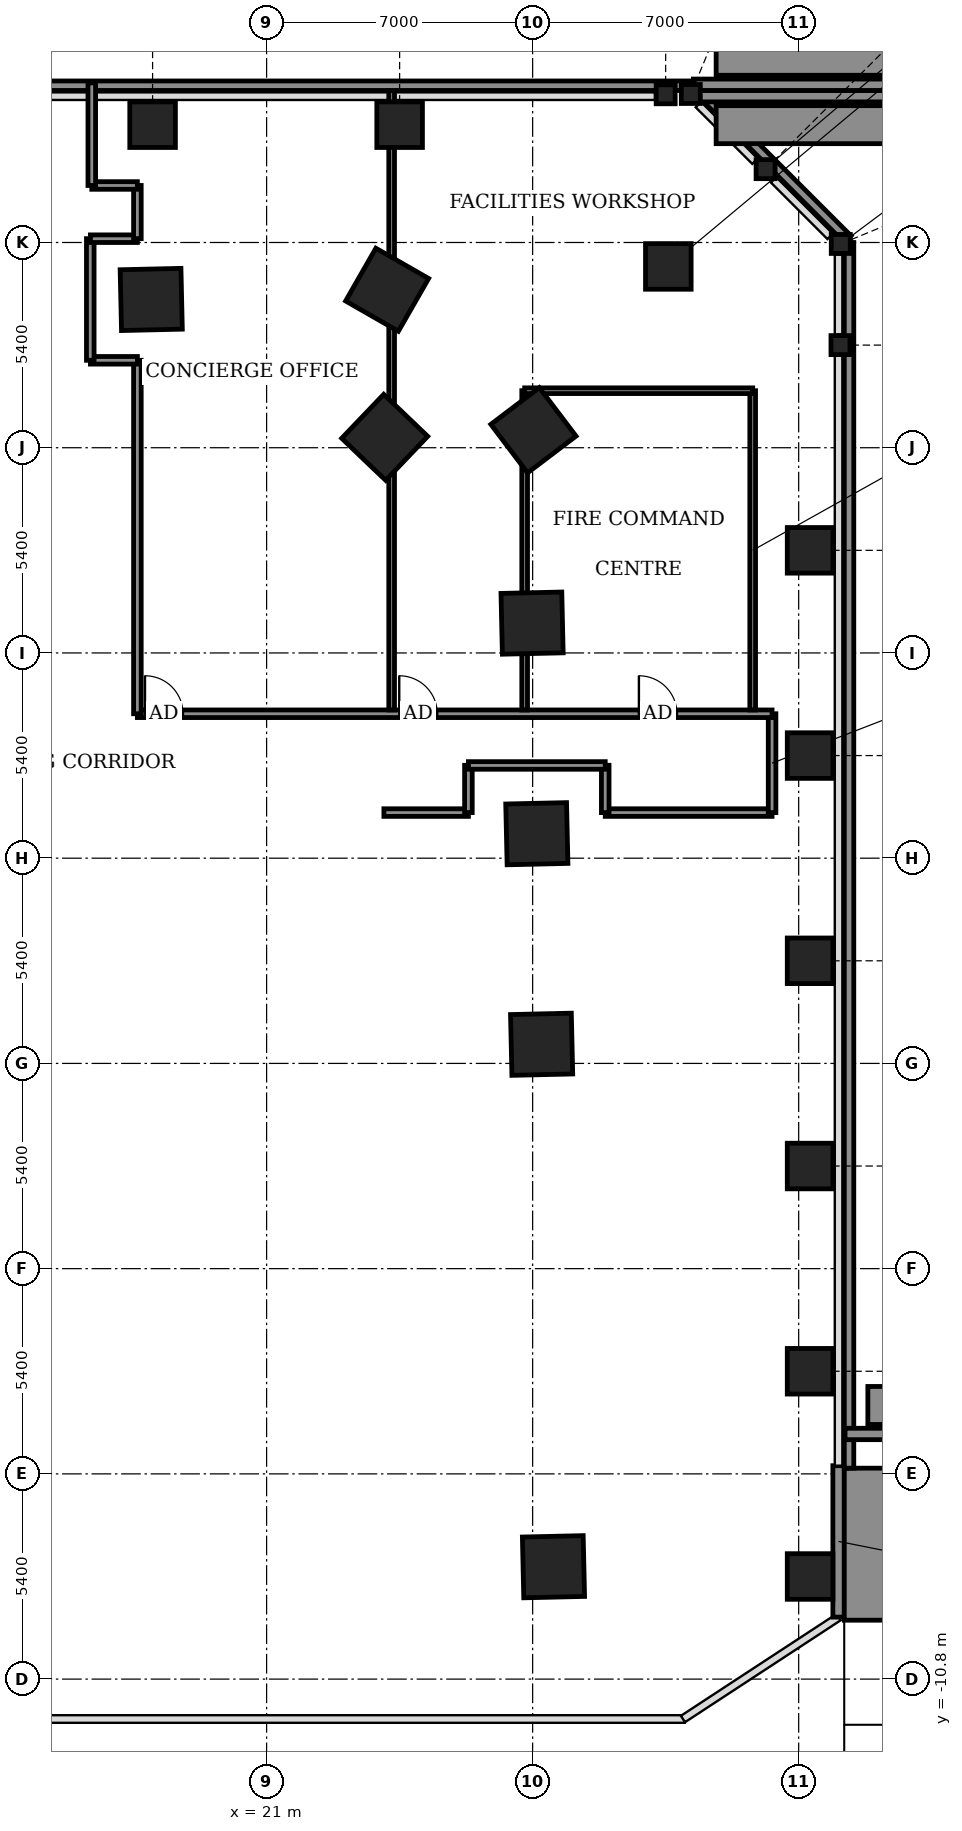
"""IFC4 building model, lengths in metres.
Left out: names, types, materials, properties, quantities, classifications, styles, units other than length and angle.
Written with IfcOpenShell. Run it as: python <this file> out.ifc"""

import sys

from ifc_helpers import new_model, si_unit, direction, frame, frame_2d, origin, origin_2d, place, context, subcontext, project, spatial, rectangle, extrude, element, fill, save


model = new_model("IFC4")
c1 = context("Model", 3, precision=1e-05, world=origin(), true_north=direction((0.0, 1.0)))
c2 = subcontext(c1, "Body", "Model", "MODEL_VIEW")
j1 = project(units=[si_unit("LENGTHUNIT", "METRE"), si_unit("PLANEANGLEUNIT", "RADIAN")], contexts=[c1])
p1 = place(None, origin())
s1 = spatial("IfcSite", under=j1, at=p1, CompositionType="ELEMENT")
p2 = place(p1, origin())
s2 = spatial("IfcBuilding", under=s1, at=p2, CompositionType="ELEMENT")
p3 = place(p2, origin())
s3 = spatial("IfcBuildingStorey", under=s2, at=p3, CompositionType="ELEMENT", Elevation=0.0)
for number, where, z_axis, x_axis in (
    (1, (28.548, -7.843, -0.3), (0.0, 0.0, 1.0), (-0.023, 1.0, 0.0)),
    (2, (28.236, 5.904, -0.3), (0.0, 0.0, 1.0), (-0.023, 1.0, 0.0)),
    (3, (28.11, 11.444, -0.3), (0.0, 0.0, 1.0), (-0.023, 1.0, 0.0)),
    (4, (27.985, 16.985, -0.3), (0.0, 0.0, 1.0), (-0.023, 1.0, 0.0)),
    (5, (28.021, 22.06, -0.3), (0.0, 0.0, 1.0), (-0.604, 0.797, 0.0)),
    (6, (24.107, 21.874, -0.3), (0.0, 0.0, 1.0), (-0.723, 0.691, 0.0)),
    (7, (24.171, 25.757, -0.3), (0.0, 0.0, 1.0), (-0.868, 0.497, 0.0)),
    (8, (17.964, 25.501, -0.3), (0.0, 0.0, 1.0), (-1.0, -0.023, 0.0)),
):
    element("IfcColumn", number, at=place(p3, frame(where, z_axis=z_axis, x_axis=x_axis)), inside=s3, PredefinedType="COLUMN", context=c2, shape_type="SweptSolid", body=[
        extrude(rectangle(XDim=1.6, YDim=1.6, at=origin_2d()), origin(), (0.0, 0.0, 1.0), 5.75),
    ])
for number, where, z_axis, x_axis in (
    (9, (18.0, 30.1, -0.3), (0.0, 0.0, 1.0), (1.0, 0.0, 0.0)),
    (10, (24.5, 30.1, -0.3), (0.0, 0.0, 1.0), (1.0, 0.0, 0.0)),
    (11, (35.3, -8.1, -0.3), (0.0, 0.0, 1.0), (1.0, 0.0, 0.0)),
    (12, (35.3, -2.7, -0.3), (0.0, 0.0, 1.0), (1.0, 0.0, 0.0)),
    (13, (35.3, 2.7, -0.3), (0.0, 0.0, 1.0), (1.0, 0.0, 0.0)),
    (14, (35.3, 8.1, -0.3), (0.0, 0.0, 1.0), (1.0, 0.0, 0.0)),
    (15, (35.3, 13.5, -0.3), (0.0, 0.0, 1.0), (1.0, 0.0, 0.0)),
    (16, (35.3, 18.9, -0.3), (0.0, 0.0, 1.0), (1.0, 0.0, 0.0)),
    (17, (31.57, 26.37, -0.3), (0.0, 0.0, 1.0), (1.0, 0.0, 0.0)),
):
    element("IfcColumn", number, at=place(p3, frame(where, z_axis=z_axis, x_axis=x_axis)), inside=s3, PredefinedType="COLUMN", context=c2, shape_type="SweptSolid", body=[
        extrude(rectangle(XDim=1.2, YDim=1.2, at=origin_2d()), origin(), (0.0, 0.0, 1.0), 5.75),
    ])
for number, where, z_axis, x_axis in (
    (18, (36.1, 24.3, -0.3), (0.0, 0.0, 1.0), (1.0, 0.0, 0.0)),
    (19, (36.108, 26.962, -0.3), (0.0, 0.0, 1.0), (1.0, 0.0, 0.0)),
    (20, (31.5, 30.9, -0.3), (0.0, 0.0, 1.0), (1.0, 0.0, 0.0)),
    (21, (32.162, 30.908, -0.3), (0.0, 0.0, 1.0), (1.0, 0.0, 0.0)),
    (22, (34.129, 28.929, -0.3), (0.0, 0.0, 1.0), (1.0, 0.0, 0.0)),
):
    element("IfcColumn", number, at=place(p3, frame(where, z_axis=z_axis, x_axis=x_axis)), inside=s3, PredefinedType="COLUMN", context=c2, shape_type="SweptSolid", body=[
        extrude(rectangle(XDim=0.5, YDim=0.5, at=origin_2d()), origin(), (0.0, 0.0, 1.0), 5.38),
    ])
p4 = place(p3, frame((36.05, -9.169, 0.0), z_axis=(0.0, 0.0, 1.0), x_axis=(0.0, 1.0, 0.0)))
e23 = element("IfcWall", 23, at=p4, inside=s3, PredefinedType="SOLIDWALL", context=c2, shape_type="SweptSolid", body=[
    extrude(rectangle(XDim=3.984, YDim=0.3, at=frame_2d((1.992, 0.0))), origin(), (0.0, 0.0, 1.0), 5.45),
])
p5 = place(p3, frame((37.45, -9.25, 0.0), z_axis=(0.0, 0.0, 1.0), x_axis=(0.0, 1.0, 0.0)))
e24 = element("IfcWall", 24, at=p5, inside=s3, PredefinedType="STANDARD", context=c2, shape_type="SweptSolid", body=[
    extrude(rectangle(XDim=4.0, YDim=2.5, at=frame_2d((2.0, 0.0))), origin(), (0.0, 0.0, 1.0), 6.0),
])
p6 = place(p3, frame((36.325, -5.25, 0.0), z_axis=(0.0, 0.0, 1.0), x_axis=(0.0, 1.0, 0.0)))
e25 = element("IfcWall", 25, at=p6, inside=s3, PredefinedType="STANDARD", context=c2, shape_type="SweptSolid", body=[
    extrude(rectangle(XDim=32.25, YDim=0.25, at=frame_2d((16.125, 0.0))), origin(), (0.0, 0.0, 1.0), 0.9),
])
p7 = place(p3, frame((36.288, 27.088, 0.0), z_axis=(0.0, 0.0, 1.0), x_axis=(-0.707106781187, 0.707106781187, 0.0)))
e26 = element("IfcWall", 26, at=p7, inside=s3, PredefinedType="STANDARD", context=c2, shape_type="SweptSolid", body=[
    extrude(rectangle(XDim=5.657, YDim=0.25, at=frame_2d((2.828, 0.0))), origin(), (0.0, 0.0, 1.0), 0.9),
])
p8 = place(p3, frame((32.2, 31.125, 0.0), z_axis=(0.0, 0.0, 1.0), x_axis=(-1.0, 0.0, 0.0)))
e27 = element("IfcWall", 27, at=p8, inside=s3, PredefinedType="STANDARD", context=c2, shape_type="SweptSolid", body=[
    extrude(rectangle(XDim=28.9, YDim=0.25, at=frame_2d((14.45, 0.0))), origin(), (0.0, 0.0, 1.0), 0.9),
])
p9 = place(p3, frame((36.22, -4.35, 5.5), z_axis=(0.0, 0.0, 1.0), x_axis=(1.0, 0.0, 0.0)))
e28 = element("IfcWall", 28, at=p9, inside=s3, PredefinedType="PARAPET", context=c2, shape_type="SweptSolid", body=[
    extrude(rectangle(XDim=6.18, YDim=0.3, at=frame_2d((3.09, 0.0))), origin(), (0.0, 0.0, 1.0), 1.15),
])
p10 = place(p3, frame((36.82, -3.6, 5.5), z_axis=(0.0, 0.0, 1.0), x_axis=(1.0, 0.0, 0.0)))
e29 = element("IfcWall", 29, at=p10, inside=s3, PredefinedType="SOLIDWALL", context=c2, shape_type="SweptSolid", body=[
    extrude(rectangle(XDim=4.98, YDim=1.0, at=frame_2d((2.49, 0.0))), origin(), (0.0, 0.0, 1.0), 0.3),
])
p11 = place(p3, frame((41.268, 30.85, 5.5), z_axis=(0.0, 0.0, 1.0), x_axis=(-1.0, 0.0, 0.0)))
e30 = element("IfcWall", 30, at=p11, inside=s3, PredefinedType="PARAPET", context=c2, shape_type="SweptSolid", body=[
    extrude(rectangle(XDim=9.04, YDim=0.3, at=frame_2d((4.52, 0.0))), origin(), (0.0, 0.0, 1.0), 1.15),
])
p12 = place(p3, frame((40.668, 30.1, 5.5), z_axis=(0.0, 0.0, 1.0), x_axis=(-1.0, 0.0, 0.0)))
e31 = element("IfcWall", 31, at=p12, inside=s3, PredefinedType="SOLIDWALL", context=c2, shape_type="SweptSolid", body=[
    extrude(rectangle(XDim=7.84, YDim=1.0, at=frame_2d((3.92, 0.0))), origin(), (0.0, 0.0, 1.0), 0.3),
])
p13 = place(p3, frame((32.228, 31.15, 5.5), z_axis=(0.0, 0.0, 1.0), x_axis=(1.0, 0.0, 0.0)))
e32 = element("IfcWall", 32, at=p13, inside=s3, PredefinedType="PARAPET", context=c2, shape_type="SweptSolid", body=[
    extrude(rectangle(XDim=8.44, YDim=0.3, at=frame_2d((4.22, 0.0))), origin(), (0.0, 0.0, 1.0), 1.15),
])
p14 = place(p3, frame((32.828, 31.9, 5.5), z_axis=(0.0, 0.0, 1.0), x_axis=(1.0, 0.0, 0.0)))
e33 = element("IfcWall", 33, at=p14, inside=s3, PredefinedType="SOLIDWALL", context=c2, shape_type="SweptSolid", body=[
    extrude(rectangle(XDim=6.39, YDim=1.0, at=frame_2d((3.195, 0.0))), origin(), (0.0, 0.0, 1.0), 0.3),
])
p15 = place(p3, frame((40.774, 31.406, 5.5), z_axis=(0.0, 0.0, 1.0), x_axis=(-0.707106781187, 0.707106781187, 0.0)))
e34 = element("IfcWall", 34, at=p15, inside=s3, PredefinedType="PARAPET", context=c2, shape_type="SweptSolid", body=[
    extrude(rectangle(XDim=8.344, YDim=0.3, at=frame_2d((4.172, 0.0))), origin(), (0.0, 0.0, 1.0), 1.15),
])
p16 = place(p3, frame((24.086, 12.0, 0.0), z_axis=(0.0, 0.0, 1.0), x_axis=(1.0, 0.0, 0.0)))
e35 = element("IfcWall", 35, at=p16, inside=s3, PredefinedType="PARTITIONING", context=c2, shape_type="SweptSolid", body=[
    extrude(rectangle(XDim=2.224, YDim=0.2, at=frame_2d((1.112, 0.0))), origin(), (0.0, 0.0, 1.0), 5.45),
])
p17 = place(p3, frame((26.31, 12.0, 0.0), z_axis=(0.0, 0.0, 1.0), x_axis=(0.0, 1.0, 0.0)))
e36 = element("IfcWall", 36, at=p17, inside=s3, PredefinedType="PARTITIONING", context=c2, shape_type="SweptSolid", body=[
    extrude(rectangle(XDim=1.244, YDim=0.2, at=frame_2d((0.622, 0.0))), origin(), (0.0, 0.0, 1.0), 5.45),
])
p18 = place(p3, frame((29.91, 12.0, 0.0), z_axis=(0.0, 0.0, 1.0), x_axis=(1.0, 0.0, 0.0)))
e37 = element("IfcWall", 37, at=p18, inside=s3, PredefinedType="PARTITIONING", context=c2, shape_type="SweptSolid", body=[
    extrude(rectangle(XDim=4.39, YDim=0.2, at=frame_2d((2.195, 0.0))), origin(), (0.0, 0.0, 1.0), 5.45),
])
p19 = place(p3, frame((29.91, 12.0, 0.0), z_axis=(0.0, 0.0, 1.0), x_axis=(0.0, 1.0, 0.0)))
e38 = element("IfcWall", 38, at=p19, inside=s3, PredefinedType="PARTITIONING", context=c2, shape_type="SweptSolid", body=[
    extrude(rectangle(XDim=1.244, YDim=0.2, at=frame_2d((0.622, 0.0))), origin(), (0.0, 0.0, 1.0), 5.45),
])
p20 = place(p3, frame((34.3, 12.0, 0.0), z_axis=(0.0, 0.0, 1.0), x_axis=(0.0, 1.0, 0.0)))
e39 = element("IfcWall", 39, at=p20, inside=s3, PredefinedType="PARTITIONING", context=c2, shape_type="SweptSolid", body=[
    extrude(rectangle(XDim=2.6, YDim=0.2, at=frame_2d((1.3, 0.0))), origin(), (0.0, 0.0, 1.0), 5.45),
])
p21 = place(p3, frame((26.31, 13.24, 0.0), z_axis=(0.0, 0.0, 1.0), x_axis=(1.0, 0.0, 0.0)))
e40 = element("IfcWall", 40, at=p21, inside=s3, PredefinedType="PARTITIONING", context=c2, shape_type="SweptSolid", body=[
    extrude(rectangle(XDim=3.6, YDim=0.2, at=frame_2d((1.8, 0.0))), origin(), (0.0, 0.0, 1.0), 5.45),
])
p22 = place(p3, frame((17.6, 14.6, 0.0), z_axis=(0.0, 0.0, 1.0), x_axis=(1.0, 0.0, 0.0)))
e41 = element("IfcWall", 41, at=p22, inside=s3, PredefinedType="PARTITIONING", context=c2, shape_type="SweptSolid", body=[
    extrude(rectangle(XDim=16.7, YDim=0.2, at=frame_2d((8.35, 0.0))), origin(), (0.0, 0.0, 1.0), 5.45),
])
p23 = place(p22, frame((13.196, 0.0, 0.0)))
e42 = element("IfcOpeningElement", 42, at=p23, cuts=e41, PredefinedType="OPENING", context=c2, shape_type="SweptSolid", body=[
    extrude(rectangle(XDim=1.0, YDim=2.1, at=frame_2d((0.5, 1.05))), frame((0.0, 0.11, 0.0), z_axis=(0.0, -1.0, 0.0), x_axis=(1.0, 0.0, 0.0)), (0.0, 0.0, 1.0), 0.22),
])
p24 = place(p22, frame((0.2, 0.0, 0.0)))
e43 = element("IfcOpeningElement", 43, at=p24, cuts=e41, PredefinedType="OPENING", context=c2, shape_type="SweptSolid", body=[
    extrude(rectangle(XDim=1.0, YDim=2.1, at=frame_2d((0.5, 1.05))), frame((0.0, 0.11, 0.0), z_axis=(0.0, -1.0, 0.0), x_axis=(1.0, 0.0, 0.0)), (0.0, 0.0, 1.0), 0.22),
])
p25 = place(p22, frame((6.89, 0.0, 0.0)))
e44 = element("IfcOpeningElement", 44, at=p25, cuts=e41, PredefinedType="OPENING", context=c2, shape_type="SweptSolid", body=[
    extrude(rectangle(XDim=1.0, YDim=2.1, at=frame_2d((0.5, 1.05))), frame((0.0, 0.11, 0.0), z_axis=(0.0, -1.0, 0.0), x_axis=(1.0, 0.0, 0.0)), (0.0, 0.0, 1.0), 0.22),
])
p26 = place(p3, frame((17.6, 14.6, 0.0), z_axis=(0.0, 0.0, 1.0), x_axis=(0.0, 1.0, 0.0)))
e45 = element("IfcWall", 45, at=p26, inside=s3, PredefinedType="PARTITIONING", context=c2, shape_type="SweptSolid", body=[
    extrude(rectangle(XDim=9.301, YDim=0.2, at=frame_2d((4.65, 0.0))), origin(), (0.0, 0.0, 1.0), 5.45),
])
p27 = place(p3, frame((24.29, 14.7, 0.0), z_axis=(0.0, 0.0, 1.0), x_axis=(0.0, 1.0, 0.0)))
e46 = element("IfcWall", 46, at=p27, inside=s3, PredefinedType="PARTITIONING", context=c2, shape_type="SweptSolid", body=[
    extrude(rectangle(XDim=16.3, YDim=0.15, at=frame_2d((8.15, 0.0))), origin(), (0.0, 0.0, 1.0), 4.49),
])
for number, where, z_axis, x_axis in (
    (47, (27.79, 14.7, 0.0), (0.0, 0.0, 1.0), (0.0, 1.0, 0.0)),
    (48, (33.79, 14.7, 0.0), (0.0, 0.0, 1.0), (0.0, 1.0, 0.0)),
):
    element("IfcWall", number, at=place(p3, frame(where, z_axis=z_axis, x_axis=x_axis)), inside=s3, PredefinedType="PARTITIONING", context=c2, shape_type="SweptSolid", body=[
        extrude(rectangle(XDim=8.4, YDim=0.15, at=frame_2d((4.2, 0.0))), origin(), (0.0, 0.0, 1.0), 5.45),
    ])
p28 = place(p3, frame((27.79, 23.1, 0.0), z_axis=(0.0, 0.0, 1.0), x_axis=(1.0, 0.0, 0.0)))
e49 = element("IfcWall", 49, at=p28, inside=s3, PredefinedType="PARTITIONING", context=c2, shape_type="SweptSolid", body=[
    extrude(rectangle(XDim=6.0, YDim=0.15, at=frame_2d((3.0, 0.0))), origin(), (0.0, 0.0, 1.0), 5.45),
])
p29 = place(p3, frame((16.364, 23.9, 0.0), z_axis=(0.0, 0.0, 1.0), x_axis=(1.0, 0.0, 0.0)))
e50 = element("IfcWall", 50, at=p29, inside=s3, PredefinedType="PARTITIONING", context=c2, shape_type="SweptSolid", body=[
    extrude(rectangle(XDim=1.236, YDim=0.2, at=frame_2d((0.618, 0.0))), origin(), (0.0, 0.0, 1.0), 5.45),
])
p30 = place(p3, frame((16.36, 23.901, 0.0), z_axis=(0.0, 0.0, 1.0), x_axis=(0.0, 1.0, 0.0)))
e51 = element("IfcWall", 51, at=p30, inside=s3, PredefinedType="PARTITIONING", context=c2, shape_type="SweptSolid", body=[
    extrude(rectangle(XDim=3.2, YDim=0.2, at=frame_2d((1.6, 0.0))), origin(), (0.0, 0.0, 1.0), 5.45),
])
p31 = place(p3, frame((16.364, 27.1, 0.0), z_axis=(0.0, 0.0, 1.0), x_axis=(1.0, 0.0, 0.0)))
e52 = element("IfcWall", 52, at=p31, inside=s3, PredefinedType="PARTITIONING", context=c2, shape_type="SweptSolid", body=[
    extrude(rectangle(XDim=1.236, YDim=0.2, at=frame_2d((0.618, 0.0))), origin(), (0.0, 0.0, 1.0), 5.45),
])
p32 = place(p3, frame((17.6, 27.101, 0.0), z_axis=(0.0, 0.0, 1.0), x_axis=(0.0, 1.0, 0.0)))
e53 = element("IfcWall", 53, at=p32, inside=s3, PredefinedType="PARTITIONING", context=c2, shape_type="SweptSolid", body=[
    extrude(rectangle(XDim=1.399, YDim=0.2, at=frame_2d((0.699, 0.0))), origin(), (0.0, 0.0, 1.0), 5.45),
])
p33 = place(p3, frame((16.4, 28.5, 0.0), z_axis=(0.0, 0.0, 1.0), x_axis=(1.0, 0.0, 0.0)))
e54 = element("IfcWall", 54, at=p33, inside=s3, PredefinedType="PARTITIONING", context=c2, shape_type="SweptSolid", body=[
    extrude(rectangle(XDim=1.2, YDim=0.2, at=frame_2d((0.6, 0.0))), origin(), (0.0, 0.0, 1.0), 5.45),
])
p34 = place(p3, frame((16.4, 28.5, 0.0), z_axis=(0.0, 0.0, 1.0), x_axis=(0.0, 1.0, 0.0)))
e55 = element("IfcWall", 55, at=p34, inside=s3, PredefinedType="PARTITIONING", context=c2, shape_type="SweptSolid", body=[
    extrude(rectangle(XDim=2.7, YDim=0.2, at=frame_2d((1.35, 0.0))), origin(), (0.0, 0.0, 1.0), 4.49),
])
p35 = place(p23, origin())
e56 = element("IfcDoor", 56, at=p35, inside=s3, OperationType="SINGLE_SWING_LEFT", PredefinedType="DOOR", context=c2, shape_type="SweptSolid", body=[
    extrude(rectangle(XDim=1.0, YDim=2.1, at=frame_2d((0.5, 1.05))), frame((0.0, 0.025, 0.0), z_axis=(0.0, -1.0, 0.0), x_axis=(1.0, 0.0, 0.0)), (0.0, 0.0, 1.0), 0.05),
])
fill(e42, e56)
p36 = place(p24, origin())
e57 = element("IfcDoor", 57, at=p36, inside=s3, OperationType="SINGLE_SWING_RIGHT", PredefinedType="DOOR", context=c2, shape_type="SweptSolid", body=[
    extrude(rectangle(XDim=1.0, YDim=2.1, at=frame_2d((0.5, 1.05))), frame((0.0, 0.025, 0.0), z_axis=(0.0, -1.0, 0.0), x_axis=(1.0, 0.0, 0.0)), (0.0, 0.0, 1.0), 0.05),
])
fill(e43, e57)
p37 = place(p25, origin())
e58 = element("IfcDoor", 58, at=p37, inside=s3, OperationType="SINGLE_SWING_LEFT", PredefinedType="DOOR", context=c2, shape_type="SweptSolid", body=[
    extrude(rectangle(XDim=1.0, YDim=2.1, at=frame_2d((0.5, 1.05))), frame((0.0, 0.025, 0.0), z_axis=(0.0, -1.0, 0.0), x_axis=(1.0, 0.0, 0.0)), (0.0, 0.0, 1.0), 0.05),
])
fill(e44, e58)
save(model, sys.argv[1])
